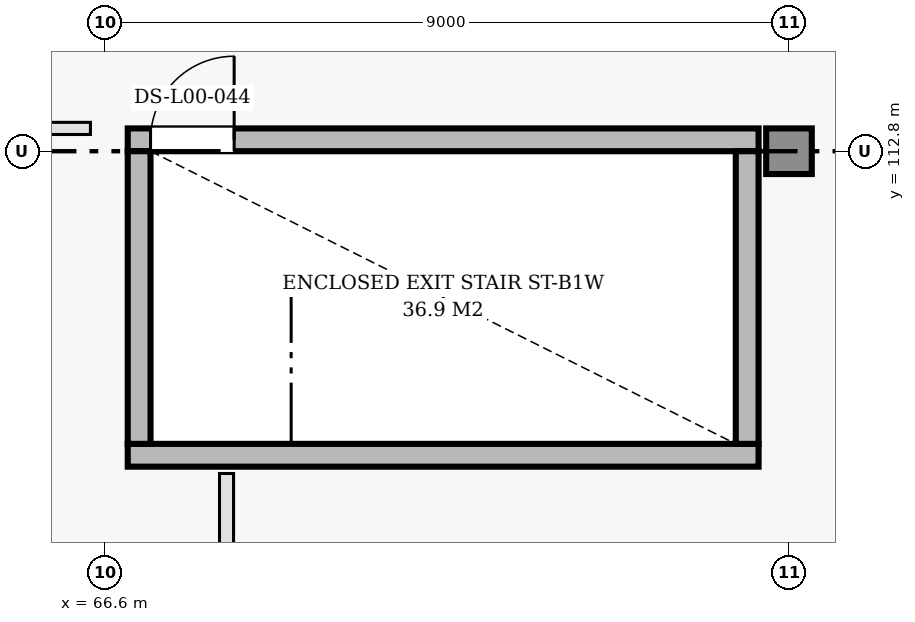
"""IFC4 building model, lengths in metres.
Left out: names, types, materials, properties, quantities, classifications, styles, units other than length and angle.
Written with IfcOpenShell. Run it as: python <this file> out.ifc"""

import sys

from ifc_helpers import new_model, si_unit, direction, frame, frame_2d, origin, origin_2d, place, context, subcontext, project, spatial, rectangle, extrude, element, fill, save


model = new_model("IFC4")
c1 = context("Model", 3, precision=1e-05, world=origin(), true_north=direction((0.0, 1.0)))
c2 = subcontext(c1, "Body", "Model", "MODEL_VIEW")
j1 = project(units=[si_unit("LENGTHUNIT", "METRE"), si_unit("PLANEANGLEUNIT", "RADIAN")], contexts=[c1])
p1 = place(None, origin())
s1 = spatial("IfcSite", under=j1, at=p1, CompositionType="ELEMENT")
p2 = place(p1, origin())
s2 = spatial("IfcBuilding", under=s1, at=p2, CompositionType="ELEMENT")
p3 = place(p2, origin())
s3 = spatial("IfcBuildingStorey", under=s2, at=p3, CompositionType="ELEMENT", Elevation=0.0)
p4 = place(p3, frame((75.6, 112.8, 0.0), z_axis=(0.0, 0.0, 1.0), x_axis=(1.0, 0.0, 0.0)))
e1 = element("IfcColumn", 1, at=p4, inside=s3, PredefinedType="COLUMN", context=c2, shape_type="SweptSolid", body=[
    extrude(rectangle(XDim=0.6, YDim=0.6, at=origin_2d()), origin(), (0.0, 0.0, 1.0), 4.8),
])
p5 = place(p3, frame((66.9, 108.8, 0.0), z_axis=(0.0, 0.0, 1.0), x_axis=(1.0, 0.0, 0.0)))
e2 = element("IfcWall", 2, at=p5, inside=s3, PredefinedType="SHEAR", context=c2, shape_type="SweptSolid", body=[
    extrude(rectangle(XDim=8.3, YDim=0.3, at=frame_2d((4.15, 0.0))), origin(), (0.0, 0.0, 1.0), 4.6),
])
p6 = place(p3, frame((66.9, 112.95, 0.0), z_axis=(0.0, 0.0, 1.0), x_axis=(1.0, 0.0, 0.0)))
e3 = element("IfcWall", 3, at=p6, inside=s3, PredefinedType="SHEAR", context=c2, shape_type="SweptSolid", body=[
    extrude(rectangle(XDim=8.3, YDim=0.3, at=frame_2d((4.15, 0.0))), origin(), (0.0, 0.0, 1.0), 4.6),
])
p7 = place(p6, frame((0.3, 0.0, 0.0)))
e4 = element("IfcOpeningElement", 4, at=p7, cuts=e3, PredefinedType="OPENING", context=c2, shape_type="SweptSolid", body=[
    extrude(rectangle(XDim=1.1, YDim=2.15, at=frame_2d((0.55, 1.075))), frame((0.0, 0.16, 0.0), z_axis=(0.0, -1.0, 0.0), x_axis=(1.0, 0.0, 0.0)), (0.0, 0.0, 1.0), 0.32),
])
for number, where, z_axis, x_axis in (
    (5, (67.05, 108.95, 0.0), (0.0, 0.0, 1.0), (0.0, 1.0, 0.0)),
    (6, (75.05, 108.95, 0.0), (0.0, 0.0, 1.0), (0.0, 1.0, 0.0)),
):
    element("IfcWall", number, at=place(p3, frame(where, z_axis=z_axis, x_axis=x_axis)), inside=s3, PredefinedType="SHEAR", context=c2, shape_type="SweptSolid", body=[
        extrude(rectangle(XDim=3.85, YDim=0.3, at=frame_2d((1.925, 0.0))), origin(), (0.0, 0.0, 1.0), 4.6),
    ])
p8 = place(p3, frame((68.2, 103.855, 0.0), z_axis=(0.0, 0.0, 1.0), x_axis=(0.0, 1.0, 0.0)))
e7 = element("IfcWall", 7, at=p8, inside=s3, PredefinedType="PARTITIONING", context=c2, shape_type="SweptSolid", body=[
    extrude(rectangle(XDim=4.705, YDim=0.185, at=frame_2d((2.353, 0.0))), origin(), (0.0, 0.0, 1.0), 3.755),
])
p9 = place(p8, frame((1.502, 0.0, 0.0)))
e8 = element("IfcOpeningElement", 8, at=p9, cuts=e7, PredefinedType="OPENING", context=c2, shape_type="SweptSolid", body=[
    extrude(rectangle(XDim=1.7, YDim=2.2, at=frame_2d((0.85, 1.1))), frame((0.0, 0.103, 0.0), z_axis=(0.0, -1.0, 0.0), x_axis=(1.0, 0.0, 0.0)), (0.0, 0.0, 1.0), 0.205),
])
p10 = place(p3, frame((39.44, 113.1, 0.0), z_axis=(0.0, 0.0, 1.0), x_axis=(1.0, 0.0, 0.0)))
e9 = element("IfcWall", 9, at=p10, inside=s3, PredefinedType="PARTITIONING", context=c2, shape_type="SweptSolid", body=[
    extrude(rectangle(XDim=26.969, YDim=0.16, at=frame_2d((13.484, 0.0))), origin(), (0.0, 0.0, 1.0), 3.605),
])
p11 = place(p7, origin())
e10 = element("IfcDoor", 10, at=p11, inside=s3, OperationType="SINGLE_SWING_RIGHT", PredefinedType="DOOR", context=c2, shape_type="SweptSolid", body=[
    extrude(rectangle(XDim=1.1, YDim=2.15, at=frame_2d((0.55, 1.075))), frame((0.0, 0.025, 0.0), z_axis=(0.0, -1.0, 0.0), x_axis=(1.0, 0.0, 0.0)), (0.0, 0.0, 1.0), 0.05),
])
fill(e4, e10)
save(model, sys.argv[1])
